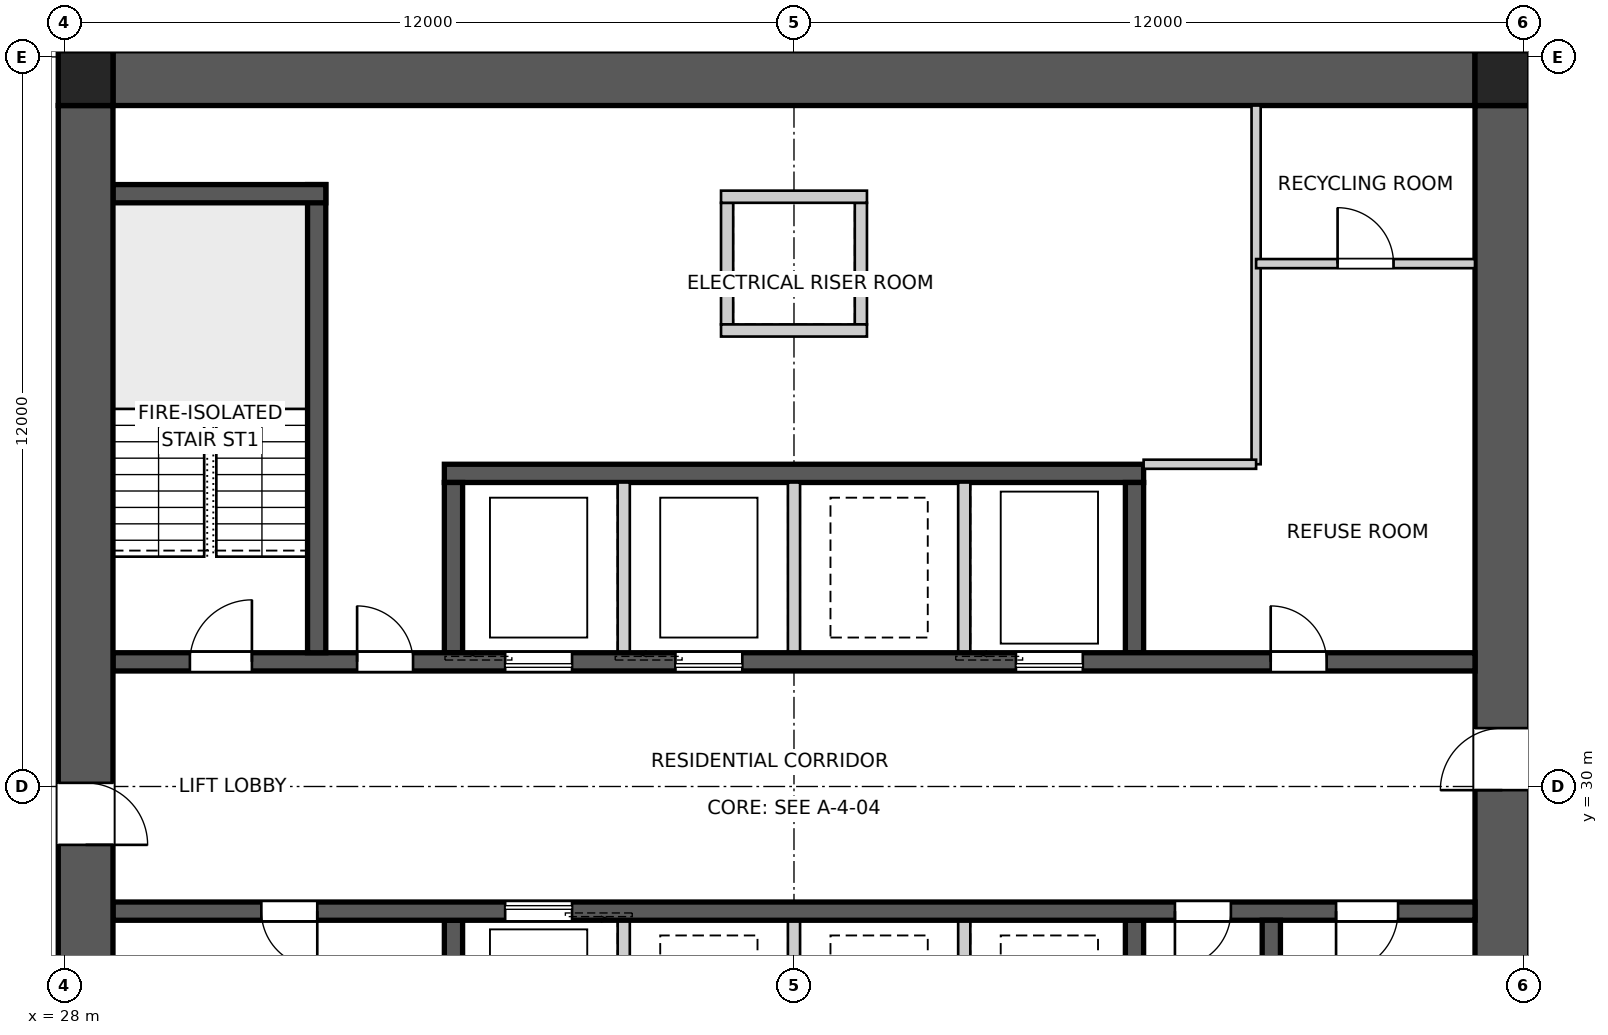
"""IFC4 building model, lengths in metres.
Left out: names, types, materials, properties, quantities, classifications, styles, units other than length and angle.
Written with IfcOpenShell. Run it as: python <this file> out.ifc"""

import sys

from ifc_helpers import new_model, si_unit, direction, frame, frame_2d, origin, origin_2d, place, context, subcontext, project, spatial, polyline, rectangle, outline, extrude, element, fill, save


model = new_model("IFC4")
c1 = context("Model", 3, precision=1e-05, world=origin(), true_north=direction((0.0, 1.0)))
c2 = subcontext(c1, "Body", "Model", "MODEL_VIEW")
j1 = project(units=[si_unit("LENGTHUNIT", "METRE"), si_unit("PLANEANGLEUNIT", "RADIAN")], contexts=[c1])
p1 = place(None, origin())
s1 = spatial("IfcSite", under=j1, at=p1, CompositionType="ELEMENT")
p2 = place(p1, origin())
s2 = spatial("IfcBuilding", under=s1, at=p2, CompositionType="ELEMENT")
p3 = place(p2, frame((0.0, 0.0, 71.0)))
s3 = spatial("IfcBuildingStorey", under=s2, at=p3, CompositionType="ELEMENT", Elevation=71.0)
p4 = place(p3, frame((28.8, 41.65, 0.0), z_axis=(0.0, 0.0, 1.0), x_axis=(1.0, 0.0, 0.0)))
e1 = element("IfcWall", 1, at=p4, inside=s3, PredefinedType="SHEAR", context=c2, shape_type="SweptSolid", body=[
    extrude(outline(polyline([(0.0, -0.45), (22.4, -0.45), (22.4, -0.025), (22.85, -0.025), (22.85, 0.025), (22.4, 0.025), (22.4, 0.45), (0.0, 0.45), (0.0, 0.025), (-0.45, 0.025), (-0.45, -0.025), (0.0, -0.025), (0.0, -0.45)])), origin(), (0.0, 0.0, 1.0), 3.4),
])
p5 = place(p3, frame((51.65, 18.8, 0.0), z_axis=(0.0, 0.0, 1.0), x_axis=(0.0, 1.0, 0.0)))
e2 = element("IfcWall", 2, at=p5, inside=s3, PredefinedType="SHEAR", context=c2, shape_type="SweptSolid", body=[
    extrude(outline(polyline([(0.0, -0.45), (22.4, -0.45), (22.4, -0.025), (22.85, -0.025), (22.85, 0.025), (22.4, 0.025), (22.4, 0.45), (0.0, 0.45), (0.0, 0.025), (-0.45, 0.025), (-0.45, -0.025), (0.0, -0.025), (0.0, -0.45)])), origin(), (0.0, 0.0, 1.0), 3.4),
])
p6 = place(p5, frame((11.14, 0.0, 0.0)))
e3 = element("IfcOpeningElement", 3, at=p6, cuts=e2, PredefinedType="OPENING", context=c2, shape_type="SweptSolid", body=[
    extrude(rectangle(XDim=1.02, YDim=2.4, at=frame_2d((0.51, 1.2))), frame((0.0, 0.46, 0.0), z_axis=(0.0, -1.0, 0.0), x_axis=(1.0, 0.0, 0.0)), (0.0, 0.0, 1.0), 0.92),
])
p7 = place(p3, frame((28.35, 41.2, 0.0), z_axis=(0.0, 0.0, 1.0), x_axis=(0.0, -1.0, 0.0)))
e4 = element("IfcWall", 4, at=p7, inside=s3, PredefinedType="SHEAR", context=c2, shape_type="SweptSolid", body=[
    extrude(outline(polyline([(0.0, -0.45), (22.4, -0.45), (22.4, -0.025), (22.85, -0.025), (22.85, 0.025), (22.4, 0.025), (22.4, 0.45), (0.0, 0.45), (0.0, 0.025), (-0.45, 0.025), (-0.45, -0.025), (0.0, -0.025), (0.0, -0.45)])), origin(), (0.0, 0.0, 1.0), 3.4),
])
p8 = place(p7, frame((11.14, 0.0, 0.0)))
e5 = element("IfcOpeningElement", 5, at=p8, cuts=e4, PredefinedType="OPENING", context=c2, shape_type="SweptSolid", body=[
    extrude(rectangle(XDim=1.02, YDim=2.4, at=frame_2d((0.51, 1.2))), frame((0.0, 0.46, 0.0), z_axis=(0.0, -1.0, 0.0), x_axis=(1.0, 0.0, 0.0)), (0.0, 0.0, 1.0), 0.92),
])
p9 = place(p3, frame((28.8, 32.05, 0.0), z_axis=(0.0, 0.0, 1.0), x_axis=(1.0, 0.0, 0.0)))
e6 = element("IfcWall", 6, at=p9, inside=s3, PredefinedType="SHEAR", context=c2, shape_type="SweptSolid", body=[
    extrude(rectangle(XDim=22.4, YDim=0.3, at=frame_2d((11.2, 0.0))), origin(), (0.0, 0.0, 1.0), 3.4),
])
p10 = place(p9, frame((19.04, 0.0, 0.0)))
e7 = element("IfcOpeningElement", 7, at=p10, cuts=e6, PredefinedType="OPENING", context=c2, shape_type="SweptSolid", body=[
    extrude(rectangle(XDim=0.92, YDim=2.1, at=frame_2d((0.46, 1.05))), frame((0.0, 0.16, 0.0), z_axis=(0.0, -1.0, 0.0), x_axis=(1.0, 0.0, 0.0)), (0.0, 0.0, 1.0), 0.32),
])
p11 = place(p9, frame((1.265, 0.0, 0.0)))
e8 = element("IfcOpeningElement", 8, at=p11, cuts=e6, PredefinedType="OPENING", context=c2, shape_type="SweptSolid", body=[
    extrude(rectangle(XDim=1.02, YDim=2.1, at=frame_2d((0.51, 1.05))), frame((0.0, 0.16, 0.0), z_axis=(0.0, -1.0, 0.0), x_axis=(1.0, 0.0, 0.0)), (0.0, 0.0, 1.0), 0.32),
])
p12 = place(p9, frame((4.015, 0.0, 0.0)))
e9 = element("IfcOpeningElement", 9, at=p12, cuts=e6, PredefinedType="OPENING", context=c2, shape_type="SweptSolid", body=[
    extrude(rectangle(XDim=0.92, YDim=2.1, at=frame_2d((0.46, 1.05))), frame((0.0, 0.16, 0.0), z_axis=(0.0, -1.0, 0.0), x_axis=(1.0, 0.0, 0.0)), (0.0, 0.0, 1.0), 0.32),
])
p13 = place(p9, frame((6.45, 0.0, 0.0)))
e10 = element("IfcOpeningElement", 10, at=p13, cuts=e6, PredefinedType="OPENING", context=c2, shape_type="SweptSolid", body=[
    extrude(rectangle(XDim=1.1, YDim=2.1, at=frame_2d((0.55, 1.05))), frame((0.0, 0.16, 0.0), z_axis=(0.0, -1.0, 0.0), x_axis=(1.0, 0.0, 0.0)), (0.0, 0.0, 1.0), 0.32),
])
p14 = place(p9, frame((9.25, 0.0, 0.0)))
e11 = element("IfcOpeningElement", 11, at=p14, cuts=e6, PredefinedType="OPENING", context=c2, shape_type="SweptSolid", body=[
    extrude(rectangle(XDim=1.1, YDim=2.1, at=frame_2d((0.55, 1.05))), frame((0.0, 0.16, 0.0), z_axis=(0.0, -1.0, 0.0), x_axis=(1.0, 0.0, 0.0)), (0.0, 0.0, 1.0), 0.32),
])
p15 = place(p9, frame((14.85, 0.0, 0.0)))
e12 = element("IfcOpeningElement", 12, at=p15, cuts=e6, PredefinedType="OPENING", context=c2, shape_type="SweptSolid", body=[
    extrude(rectangle(XDim=1.1, YDim=2.1, at=frame_2d((0.55, 1.05))), frame((0.0, 0.16, 0.0), z_axis=(0.0, -1.0, 0.0), x_axis=(1.0, 0.0, 0.0)), (0.0, 0.0, 1.0), 0.32),
])
p16 = place(p3, frame((51.2, 27.95, 0.0), z_axis=(0.0, 0.0, 1.0), x_axis=(-1.0, 0.0, 0.0)))
e13 = element("IfcWall", 13, at=p16, inside=s3, PredefinedType="SHEAR", context=c2, shape_type="SweptSolid", body=[
    extrude(rectangle(XDim=22.4, YDim=0.3, at=frame_2d((11.2, 0.0))), origin(), (0.0, 0.0, 1.0), 3.4),
])
p17 = place(p16, frame((19.04, 0.0, 0.0)))
e14 = element("IfcOpeningElement", 14, at=p17, cuts=e13, PredefinedType="OPENING", context=c2, shape_type="SweptSolid", body=[
    extrude(rectangle(XDim=0.92, YDim=2.1, at=frame_2d((0.46, 1.05))), frame((0.0, 0.16, 0.0), z_axis=(0.0, -1.0, 0.0), x_axis=(1.0, 0.0, 0.0)), (0.0, 0.0, 1.0), 0.32),
])
p18 = place(p16, frame((1.265, 0.0, 0.0)))
e15 = element("IfcOpeningElement", 15, at=p18, cuts=e13, PredefinedType="OPENING", context=c2, shape_type="SweptSolid", body=[
    extrude(rectangle(XDim=1.02, YDim=2.1, at=frame_2d((0.51, 1.05))), frame((0.0, 0.16, 0.0), z_axis=(0.0, -1.0, 0.0), x_axis=(1.0, 0.0, 0.0)), (0.0, 0.0, 1.0), 0.32),
])
p19 = place(p16, frame((4.015, 0.0, 0.0)))
e16 = element("IfcOpeningElement", 16, at=p19, cuts=e13, PredefinedType="OPENING", context=c2, shape_type="SweptSolid", body=[
    extrude(rectangle(XDim=0.92, YDim=2.1, at=frame_2d((0.46, 1.05))), frame((0.0, 0.16, 0.0), z_axis=(0.0, -1.0, 0.0), x_axis=(1.0, 0.0, 0.0)), (0.0, 0.0, 1.0), 0.32),
])
p20 = place(p16, frame((14.85, 0.0, 0.0)))
e17 = element("IfcOpeningElement", 17, at=p20, cuts=e13, PredefinedType="OPENING", context=c2, shape_type="SweptSolid", body=[
    extrude(rectangle(XDim=1.1, YDim=2.1, at=frame_2d((0.55, 1.05))), frame((0.0, 0.16, 0.0), z_axis=(0.0, -1.0, 0.0), x_axis=(1.0, 0.0, 0.0)), (0.0, 0.0, 1.0), 0.32),
])
p21 = place(p3, frame((34.25, 35.15, 0.0), z_axis=(0.0, 0.0, 1.0), x_axis=(1.0, 0.0, 0.0)))
e18 = element("IfcWall", 18, at=p21, inside=s3, PredefinedType="SHEAR", context=c2, shape_type="SweptSolid", body=[
    extrude(rectangle(XDim=11.5, YDim=0.3, at=frame_2d((5.75, 0.0))), origin(), (0.0, 0.0, 1.0), 3.4),
])
for number, where, z_axis, x_axis in (
    (19, (34.4, 32.2, 0.0), (0.0, 0.0, 1.0), (0.0, 1.0, 0.0)),
    (20, (45.6, 27.8, 0.0), (0.0, 0.0, 1.0), (0.0, -1.0, 0.0)),
):
    element("IfcWall", number, at=place(p3, frame(where, z_axis=z_axis, x_axis=x_axis)), inside=s3, PredefinedType="SHEAR", context=c2, shape_type="SweptSolid", body=[
        extrude(rectangle(XDim=2.8, YDim=0.3, at=frame_2d((1.4, 0.0))), origin(), (0.0, 0.0, 1.0), 3.4),
    ])
for number, where, z_axis, x_axis in (
    (21, (37.2, 32.2, 0.0), (0.0, 0.0, 1.0), (0.0, 1.0, 0.0)),
    (22, (42.8, 27.8, 0.0), (0.0, 0.0, 1.0), (0.0, -1.0, 0.0)),
    (23, (40.0, 32.2, 0.0), (0.0, 0.0, 1.0), (0.0, 1.0, 0.0)),
    (24, (40.0, 27.8, 0.0), (0.0, 0.0, 1.0), (0.0, -1.0, 0.0)),
    (25, (42.8, 32.2, 0.0), (0.0, 0.0, 1.0), (0.0, 1.0, 0.0)),
    (26, (37.2, 27.8, 0.0), (0.0, 0.0, 1.0), (0.0, -1.0, 0.0)),
):
    element("IfcWall", number, at=place(p3, frame(where, z_axis=z_axis, x_axis=x_axis)), inside=s3, PredefinedType="SOLIDWALL", context=c2, shape_type="SweptSolid", body=[
        extrude(rectangle(XDim=2.8, YDim=0.2, at=frame_2d((1.4, 0.0))), origin(), (0.0, 0.0, 1.0), 3.4),
    ])
for number, where, z_axis, x_axis in (
    (27, (45.6, 32.2, 0.0), (0.0, 0.0, 1.0), (0.0, 1.0, 0.0)),
    (28, (34.4, 27.8, 0.0), (0.0, 0.0, 1.0), (0.0, -1.0, 0.0)),
):
    element("IfcWall", number, at=place(p3, frame(where, z_axis=z_axis, x_axis=x_axis)), inside=s3, PredefinedType="SHEAR", context=c2, shape_type="SweptSolid", body=[
        extrude(rectangle(XDim=2.8, YDim=0.3, at=frame_2d((1.4, 0.0))), origin(), (0.0, 0.0, 1.0), 3.4),
    ])
p22 = place(p3, frame((32.15, 32.2, 0.0), z_axis=(0.0, 0.0, 1.0), x_axis=(0.0, 1.0, 0.0)))
e29 = element("IfcWall", 29, at=p22, inside=s3, PredefinedType="SHEAR", context=c2, shape_type="SweptSolid", body=[
    extrude(rectangle(XDim=7.7, YDim=0.3, at=frame_2d((3.85, 0.0))), origin(), (0.0, 0.0, 1.0), 3.4),
])
p23 = place(p3, frame((28.8, 39.75, 0.0), z_axis=(0.0, 0.0, 1.0), x_axis=(1.0, 0.0, 0.0)))
e30 = element("IfcWall", 30, at=p23, inside=s3, PredefinedType="SHEAR", context=c2, shape_type="SweptSolid", body=[
    extrude(rectangle(XDim=3.5, YDim=0.3, at=frame_2d((1.75, 0.0))), origin(), (0.0, 0.0, 1.0), 3.4),
])
p24 = place(p3, frame((47.85, 27.8, 0.0), z_axis=(0.0, 0.0, 1.0), x_axis=(0.0, -1.0, 0.0)))
e31 = element("IfcWall", 31, at=p24, inside=s3, PredefinedType="SHEAR", context=c2, shape_type="SweptSolid", body=[
    extrude(rectangle(XDim=7.7, YDim=0.3, at=frame_2d((3.85, 0.0))), origin(), (0.0, 0.0, 1.0), 3.4),
])
for number, where, z_axis, x_axis in (
    (32, (38.9, 37.6, 0.0), (0.0, 0.0, 1.0), (0.0, 1.0, 0.0)),
    (33, (41.1, 37.6, 0.0), (0.0, 0.0, 1.0), (0.0, 1.0, 0.0)),
):
    element("IfcWall", number, at=place(p3, frame(where, z_axis=z_axis, x_axis=x_axis)), inside=s3, PredefinedType="SOLIDWALL", context=c2, shape_type="SweptSolid", body=[
        extrude(rectangle(XDim=2.0, YDim=0.2, at=frame_2d((1.0, 0.0))), origin(), (0.0, 0.0, 1.0), 3.4),
    ])
for number, where, z_axis, x_axis in (
    (34, (38.8, 37.5, 0.0), (0.0, 0.0, 1.0), (1.0, 0.0, 0.0)),
    (35, (38.8, 39.7, 0.0), (0.0, 0.0, 1.0), (1.0, 0.0, 0.0)),
):
    element("IfcWall", number, at=place(p3, frame(where, z_axis=z_axis, x_axis=x_axis)), inside=s3, PredefinedType="SOLIDWALL", context=c2, shape_type="SweptSolid", body=[
        extrude(rectangle(XDim=2.4, YDim=0.2, at=frame_2d((1.2, 0.0))), origin(), (0.0, 0.0, 1.0), 3.4),
    ])
for number, where, z_axis, x_axis in (
    (36, (51.65, 41.65, 0.0), (0.0, 0.0, 1.0), (1.0, 0.0, 0.0)),
    (37, (28.35, 41.65, 0.0), (0.0, 0.0, 1.0), (1.0, 0.0, 0.0)),
):
    element("IfcColumn", number, at=place(p3, frame(where, z_axis=z_axis, x_axis=x_axis)), inside=s3, PredefinedType="COLUMN", context=c2, shape_type="SweptSolid", body=[
        extrude(rectangle(XDim=0.9, YDim=0.9, at=origin_2d()), origin(), (0.0, 0.0, 1.0), 3.4),
    ])
p25 = place(p3, frame((47.6, 41.2, 0.0), z_axis=(0.0, 0.0, 1.0), x_axis=(0.0, -1.0, 0.0)))
e38 = element("IfcWall", 38, at=p25, inside=s3, PredefinedType="SOLIDWALL", context=c2, shape_type="SweptSolid", body=[
    extrude(rectangle(XDim=5.9, YDim=0.15, at=frame_2d((2.95, 0.0))), origin(), (0.0, 0.0, 1.0), 3.2),
])
p26 = place(p3, frame((47.6, 35.3, 0.0), z_axis=(0.0, 0.0, 1.0), x_axis=(-1.0, 0.0, 0.0)))
e39 = element("IfcWall", 39, at=p26, inside=s3, PredefinedType="SOLIDWALL", context=c2, shape_type="SweptSolid", body=[
    extrude(rectangle(XDim=1.85, YDim=0.15, at=frame_2d((0.925, 0.0))), origin(), (0.0, 0.0, 1.0), 3.2),
])
p27 = place(p3, frame((47.6, 38.6, 0.0), z_axis=(0.0, 0.0, 1.0), x_axis=(1.0, 0.0, 0.0)))
e40 = element("IfcWall", 40, at=p27, inside=s3, PredefinedType="SOLIDWALL", context=c2, shape_type="SweptSolid", body=[
    extrude(rectangle(XDim=3.6, YDim=0.15, at=frame_2d((1.8, 0.0))), origin(), (0.0, 0.0, 1.0), 3.2),
])
p28 = place(p27, frame((1.34, 0.0, 0.0)))
e41 = element("IfcOpeningElement", 41, at=p28, cuts=e40, PredefinedType="OPENING", context=c2, shape_type="SweptSolid", body=[
    extrude(rectangle(XDim=0.92, YDim=2.1, at=frame_2d((0.46, 1.05))), frame((0.0, 0.085, 0.0), z_axis=(0.0, -1.0, 0.0), x_axis=(1.0, 0.0, 0.0)), (0.0, 0.0, 1.0), 0.17),
])
p29 = place(p10, origin())
e42 = element("IfcDoor", 42, at=p29, inside=s3, OperationType="SINGLE_SWING_LEFT", PredefinedType="DOOR", context=c2, shape_type="SweptSolid", body=[
    extrude(rectangle(XDim=0.92, YDim=2.1, at=frame_2d((0.46, 1.05))), frame((0.0, 0.025, 0.0), z_axis=(0.0, -1.0, 0.0), x_axis=(1.0, 0.0, 0.0)), (0.0, 0.0, 1.0), 0.05),
])
fill(e7, e42)
p30 = place(p17, origin())
e43 = element("IfcDoor", 43, at=p30, inside=s3, OperationType="SINGLE_SWING_LEFT", PredefinedType="DOOR", context=c2, shape_type="SweptSolid", body=[
    extrude(rectangle(XDim=0.92, YDim=2.1, at=frame_2d((0.46, 1.05))), frame((0.0, 0.025, 0.0), z_axis=(0.0, -1.0, 0.0), x_axis=(1.0, 0.0, 0.0)), (0.0, 0.0, 1.0), 0.05),
])
fill(e14, e43)
p31 = place(p18, origin())
e44 = element("IfcDoor", 44, at=p31, inside=s3, OperationType="SINGLE_SWING_RIGHT", PredefinedType="DOOR", context=c2, shape_type="SweptSolid", body=[
    extrude(rectangle(XDim=1.02, YDim=2.1, at=frame_2d((0.51, 1.05))), frame((0.0, 0.025, 0.0), z_axis=(0.0, -1.0, 0.0), x_axis=(1.0, 0.0, 0.0)), (0.0, 0.0, 1.0), 0.05),
])
fill(e15, e44)
p32 = place(p11, origin())
e45 = element("IfcDoor", 45, at=p32, inside=s3, OperationType="SINGLE_SWING_RIGHT", PredefinedType="DOOR", context=c2, shape_type="SweptSolid", body=[
    extrude(rectangle(XDim=1.02, YDim=2.1, at=frame_2d((0.51, 1.05))), frame((0.0, 0.025, 0.0), z_axis=(0.0, -1.0, 0.0), x_axis=(1.0, 0.0, 0.0)), (0.0, 0.0, 1.0), 0.05),
])
fill(e8, e45)
p33 = place(p12, origin())
e46 = element("IfcDoor", 46, at=p33, inside=s3, OperationType="SINGLE_SWING_LEFT", PredefinedType="DOOR", context=c2, shape_type="SweptSolid", body=[
    extrude(rectangle(XDim=0.92, YDim=2.1, at=frame_2d((0.46, 1.05))), frame((0.0, 0.025, 0.0), z_axis=(0.0, -1.0, 0.0), x_axis=(1.0, 0.0, 0.0)), (0.0, 0.0, 1.0), 0.05),
])
fill(e9, e46)
p34 = place(p19, origin())
e47 = element("IfcDoor", 47, at=p34, inside=s3, OperationType="SINGLE_SWING_RIGHT", PredefinedType="DOOR", context=c2, shape_type="SweptSolid", body=[
    extrude(rectangle(XDim=0.92, YDim=2.1, at=frame_2d((0.46, 1.05))), frame((0.0, 0.025, 0.0), z_axis=(0.0, -1.0, 0.0), x_axis=(1.0, 0.0, 0.0)), (0.0, 0.0, 1.0), 0.05),
])
fill(e16, e47)
p35 = place(p28, origin())
e48 = element("IfcDoor", 48, at=p35, inside=s3, OperationType="SINGLE_SWING_LEFT", PredefinedType="DOOR", context=c2, shape_type="SweptSolid", body=[
    extrude(rectangle(XDim=0.92, YDim=2.1, at=frame_2d((0.46, 1.05))), frame((0.0, 0.025, 0.0), z_axis=(0.0, -1.0, 0.0), x_axis=(1.0, 0.0, 0.0)), (0.0, 0.0, 1.0), 0.05),
])
fill(e41, e48)
p36 = place(p6, origin())
e49 = element("IfcDoor", 49, at=p36, inside=s3, OperationType="SINGLE_SWING_LEFT", PredefinedType="DOOR", context=c2, shape_type="SweptSolid", body=[
    extrude(rectangle(XDim=1.02, YDim=2.4, at=frame_2d((0.51, 1.2))), frame((0.0, 0.025, 0.0), z_axis=(0.0, -1.0, 0.0), x_axis=(1.0, 0.0, 0.0)), (0.0, 0.0, 1.0), 0.05),
])
fill(e3, e49)
p37 = place(p8, origin())
e50 = element("IfcDoor", 50, at=p37, inside=s3, OperationType="SINGLE_SWING_RIGHT", PredefinedType="DOOR", context=c2, shape_type="SweptSolid", body=[
    extrude(rectangle(XDim=1.02, YDim=2.4, at=frame_2d((0.51, 1.2))), frame((0.0, 0.025, 0.0), z_axis=(0.0, -1.0, 0.0), x_axis=(1.0, 0.0, 0.0)), (0.0, 0.0, 1.0), 0.05),
])
fill(e5, e50)
p38 = place(p13, origin())
e51 = element("IfcDoor", 51, at=p38, inside=s3, OperationType="SLIDING_TO_LEFT", PredefinedType="DOOR", context=c2, shape_type="SweptSolid", body=[
    extrude(rectangle(XDim=1.1, YDim=2.1, at=frame_2d((0.55, 1.05))), frame((0.0, 0.025, 0.0), z_axis=(0.0, -1.0, 0.0), x_axis=(1.0, 0.0, 0.0)), (0.0, 0.0, 1.0), 0.05),
])
fill(e10, e51)
p39 = place(p14, origin())
e52 = element("IfcDoor", 52, at=p39, inside=s3, OperationType="SLIDING_TO_LEFT", PredefinedType="DOOR", context=c2, shape_type="SweptSolid", body=[
    extrude(rectangle(XDim=1.1, YDim=2.1, at=frame_2d((0.55, 1.05))), frame((0.0, 0.025, 0.0), z_axis=(0.0, -1.0, 0.0), x_axis=(1.0, 0.0, 0.0)), (0.0, 0.0, 1.0), 0.05),
])
fill(e11, e52)
p40 = place(p15, origin())
e53 = element("IfcDoor", 53, at=p40, inside=s3, OperationType="SLIDING_TO_LEFT", PredefinedType="DOOR", context=c2, shape_type="SweptSolid", body=[
    extrude(rectangle(XDim=1.1, YDim=2.1, at=frame_2d((0.55, 1.05))), frame((0.0, 0.025, 0.0), z_axis=(0.0, -1.0, 0.0), x_axis=(1.0, 0.0, 0.0)), (0.0, 0.0, 1.0), 0.05),
])
fill(e12, e53)
p41 = place(p20, origin())
e54 = element("IfcDoor", 54, at=p41, inside=s3, OperationType="SLIDING_TO_LEFT", PredefinedType="DOOR", context=c2, shape_type="SweptSolid", body=[
    extrude(rectangle(XDim=1.1, YDim=2.1, at=frame_2d((0.55, 1.05))), frame((0.0, 0.025, 0.0), z_axis=(0.0, -1.0, 0.0), x_axis=(1.0, 0.0, 0.0)), (0.0, 0.0, 1.0), 0.05),
])
fill(e17, e54)
save(model, sys.argv[1])
